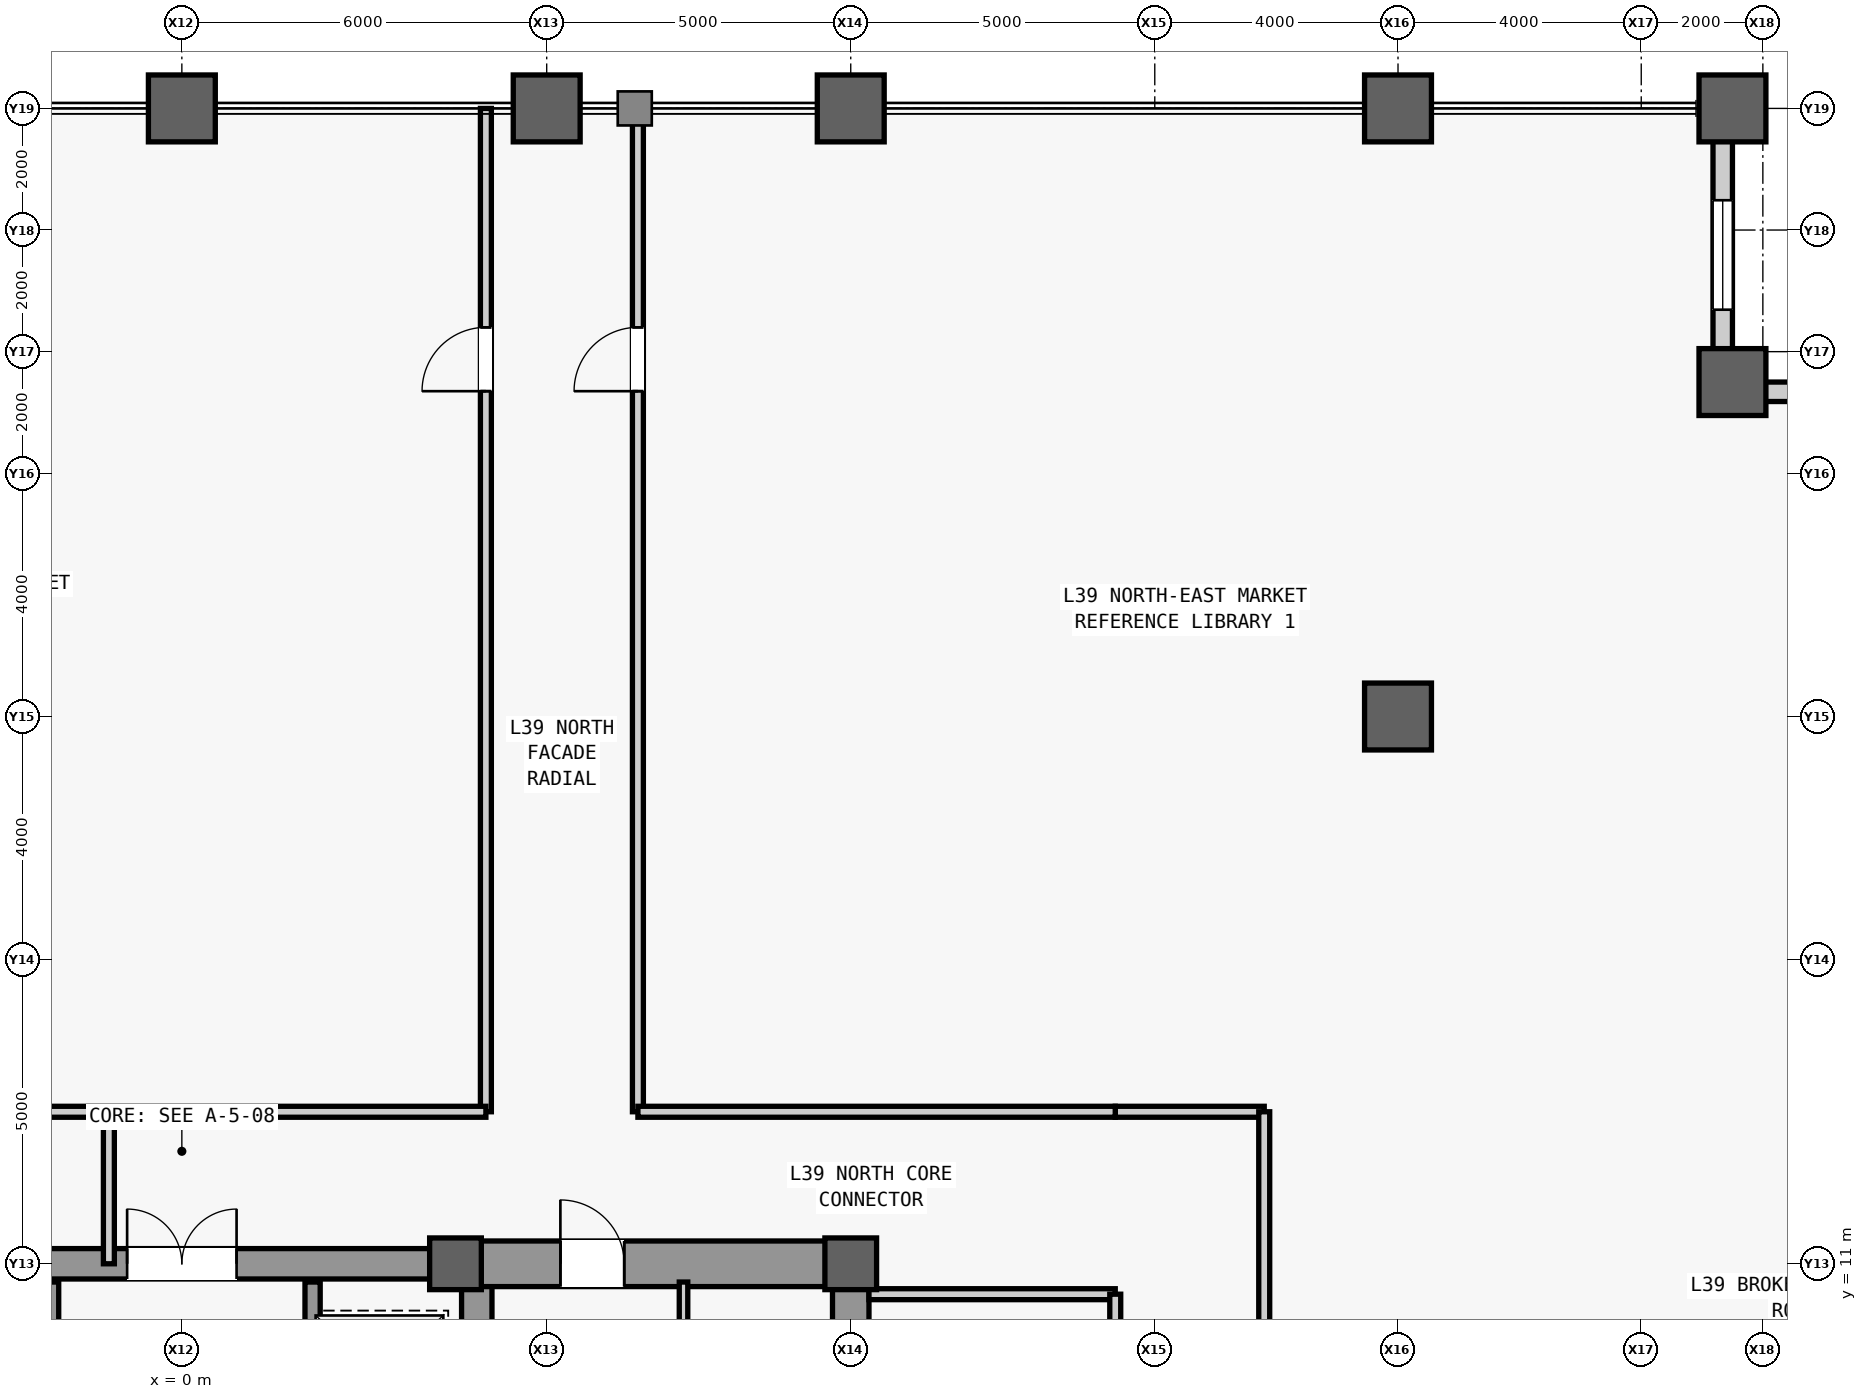
"""IFC4 building model, lengths in metres.
Left out: names, types, materials, properties, quantities, classifications, styles, units other than length and angle.
Written with IfcOpenShell. Run it as: python <this file> out.ifc"""

import sys

from ifc_helpers import new_model, si_unit, direction, frame, frame_2d, origin, origin_2d, place, context, subcontext, project, spatial, rectangle, hollow_rectangle, extrude, source, transform, mapped, element, fill, save


model = new_model("IFC4")
c1 = context("Model", 3, precision=1e-05, world=origin(), true_north=direction((0.0, 1.0)))
c2 = subcontext(c1, "Body", "Model", "MODEL_VIEW")
j1 = project(units=[si_unit("LENGTHUNIT", "METRE"), si_unit("PLANEANGLEUNIT", "RADIAN")], contexts=[c1])
p1 = place(None, origin())
s1 = spatial("IfcSite", under=j1, at=p1, CompositionType="ELEMENT")
p2 = place(p1, origin())
s2 = spatial("IfcBuilding", under=s1, at=p2, CompositionType="ELEMENT")
p3 = place(p2, frame((0.0, 0.0, 171.1)))
s3 = spatial("IfcBuildingStorey", under=s2, at=p3, CompositionType="ELEMENT", Elevation=171.1)
m1 = source(origin(), c2, "Body", "SweptSolid", [
    extrude(rectangle(XDim=22.0, YDim=0.6, at=frame_2d((11.0, 0.0))), origin(), (0.0, 0.0, 1.0), 3.78),
])
p4 = place(p3, frame((11.0, -11.0, 0.0), z_axis=(0.0, 0.0, 1.0), x_axis=(0.0, 1.0, 0.0)))
e1 = element("IfcWall", 1, at=p4, inside=s3, PredefinedType="SHEAR", context=c2, shape_type="MappedRepresentation", body=[
    mapped(m1, transform((0.0, 0.0, 0.0), scale=1.0)),
])
m2 = source(origin(), c2, "Body", "SweptSolid", [
    extrude(rectangle(XDim=1.1, YDim=2.2, at=frame_2d((0.55, 1.1))), frame((0.0, 0.31, 0.0), z_axis=(0.0, -1.0, 0.0), x_axis=(1.0, 0.0, 0.0)), (0.0, 0.0, 1.0), 0.62),
])
p5 = place(p4, frame((0.8, 0.0, 0.0)))
e2 = element("IfcOpeningElement", 2, at=p5, cuts=e1, PredefinedType="OPENING", context=c2, shape_type="MappedRepresentation", body=[
    mapped(m2, transform((0.0, 0.0, 0.0), scale=1.0)),
])
m3 = source(origin(), c2, "Body", "SweptSolid", [
    extrude(rectangle(XDim=0.9, YDim=2.15, at=frame_2d((0.45, 1.075))), frame((0.0, 0.31, 0.0), z_axis=(0.0, -1.0, 0.0), x_axis=(1.0, 0.0, 0.0)), (0.0, 0.0, 1.0), 0.62),
])
p6 = place(p4, frame((6.2, 0.0, 0.0)))
e3 = element("IfcOpeningElement", 3, at=p6, cuts=e1, PredefinedType="OPENING", context=c2, shape_type="MappedRepresentation", body=[
    mapped(m3, transform((0.0, 0.0, 0.0), scale=1.0)),
])
p7 = place(p4, frame((8.05, 0.0, 0.0)))
e4 = element("IfcOpeningElement", 4, at=p7, cuts=e1, PredefinedType="OPENING", context=c2, shape_type="MappedRepresentation", body=[
    mapped(m3, transform((0.0, 0.0, 0.0), scale=1.0)),
])
m4 = source(origin(), c2, "Body", "SweptSolid", [
    extrude(rectangle(XDim=1.3, YDim=2.3, at=frame_2d((0.65, 1.15))), frame((0.0, 0.31, 0.0), z_axis=(0.0, -1.0, 0.0), x_axis=(1.0, 0.0, 0.0)), (0.0, 0.0, 1.0), 0.62),
])
p8 = place(p4, frame((2.7, 0.0, 0.0)))
e5 = element("IfcOpeningElement", 5, at=p8, cuts=e1, PredefinedType="OPENING", context=c2, shape_type="MappedRepresentation", body=[
    mapped(m4, transform((0.0, 0.0, 0.0), scale=1.0)),
])
p9 = place(p4, frame((13.35, 0.0, 0.0)))
e6 = element("IfcOpeningElement", 6, at=p9, cuts=e1, PredefinedType="OPENING", context=c2, shape_type="MappedRepresentation", body=[
    mapped(m4, transform((0.0, 0.0, 0.0), scale=1.0)),
])
m5 = source(origin(), c2, "Body", "SweptSolid", [
    extrude(rectangle(XDim=21.4, YDim=0.5, at=frame_2d((10.7, 0.0))), origin(), (0.0, 0.0, 1.0), 3.78),
])
p10 = place(p3, frame((4.85, -10.7, 0.0), z_axis=(0.0, 0.0, 1.0), x_axis=(0.0, 1.0, 0.0)))
e7 = element("IfcWall", 7, at=p10, inside=s3, PredefinedType="SHEAR", context=c2, shape_type="MappedRepresentation", body=[
    mapped(m5, transform((0.0, 0.0, 0.0), scale=1.0)),
])
m6 = source(origin(), c2, "Body", "SweptSolid", [
    extrude(rectangle(XDim=5.85, YDim=0.75, at=frame_2d((2.925, 0.0))), origin(), (0.0, 0.0, 1.0), 3.78),
])
p11 = place(p3, frame((4.85, 11.0, 0.0), z_axis=(0.0, 0.0, 1.0), x_axis=(1.0, 0.0, 0.0)))
e8 = element("IfcWall", 8, at=p11, inside=s3, PredefinedType="SHEAR", context=c2, shape_type="MappedRepresentation", body=[
    mapped(m6, transform((0.0, 0.0, 0.0), scale=1.0)),
])
m7 = source(origin(), c2, "Body", "SweptSolid", [
    extrude(rectangle(XDim=1.05, YDim=2.2, at=frame_2d((0.525, 1.1))), frame((0.0, 0.385, 0.0), z_axis=(0.0, -1.0, 0.0), x_axis=(1.0, 0.0, 0.0)), (0.0, 0.0, 1.0), 0.77),
])
p12 = place(p11, frame((1.375, 0.0, 0.0)))
e9 = element("IfcOpeningElement", 9, at=p12, cuts=e8, PredefinedType="OPENING", context=c2, shape_type="MappedRepresentation", body=[
    mapped(m7, transform((0.0, 0.0, 0.0), scale=1.0)),
])
m8 = source(origin(), c2, "Body", "SweptSolid", [
    extrude(rectangle(XDim=9.2, YDim=0.5, at=frame_2d((4.6, 0.0))), origin(), (0.0, 0.0, 1.0), 3.78),
])
p13 = place(p3, frame((-4.6, 11.0, 0.0), z_axis=(0.0, 0.0, 1.0), x_axis=(1.0, 0.0, 0.0)))
e10 = element("IfcWall", 10, at=p13, inside=s3, PredefinedType="SHEAR", context=c2, shape_type="MappedRepresentation", body=[
    mapped(m8, transform((0.0, 0.0, 0.0), scale=1.0)),
])
m9 = source(origin(), c2, "Body", "SweptSolid", [
    extrude(rectangle(XDim=1.8, YDim=2.25, at=frame_2d((0.9, 1.125))), frame((0.0, 0.26, 0.0), z_axis=(0.0, -1.0, 0.0), x_axis=(1.0, 0.0, 0.0)), (0.0, 0.0, 1.0), 0.52),
])
p14 = place(p13, frame((3.7, 0.0, 0.0)))
e11 = element("IfcOpeningElement", 11, at=p14, cuts=e10, PredefinedType="OPENING", context=c2, shape_type="MappedRepresentation", body=[
    mapped(m9, transform((0.0, 0.0, 0.0), scale=1.0)),
])
m10 = source(origin(), c2, "Body", "SweptSolid", [
    extrude(hollow_rectangle(XDim=1.1, YDim=1.1, WallThickness=0.06, at=origin_2d()), origin(), (0.0, 0.0, 1.0), 4.0),
])
p15 = place(p3, frame((0.0, 30.0, 0.0), z_axis=(0.0, 0.0, 1.0), x_axis=(1.0, 0.0, 0.0)))
e12 = element("IfcColumn", 12, at=p15, inside=s3, PredefinedType="COLUMN", context=c2, shape_type="MappedRepresentation", body=[
    mapped(m10, transform((0.0, 0.0, 0.0), scale=1.0)),
])
m11 = source(origin(), c2, "Body", "SweptSolid", [
    extrude(rectangle(XDim=0.85, YDim=0.85, at=origin_2d()), origin(), (0.0, 0.0, 1.0), 4.0),
])
p16 = place(p3, frame((4.5, 11.0, 0.0), z_axis=(0.0, 0.0, 1.0), x_axis=(1.0, 0.0, 0.0)))
e13 = element("IfcColumn", 13, at=p16, inside=s3, PredefinedType="COLUMN", context=c2, shape_type="MappedRepresentation", body=[
    mapped(m11, transform((0.0, 0.0, 0.0), scale=1.0)),
])
p17 = place(p3, frame((6.0, 30.0, 0.0), z_axis=(0.0, 0.0, 1.0), x_axis=(1.0, 0.0, 0.0)))
e14 = element("IfcColumn", 14, at=p17, inside=s3, PredefinedType="COLUMN", context=c2, shape_type="MappedRepresentation", body=[
    mapped(m10, transform((0.0, 0.0, 0.0), scale=1.0)),
])
p18 = place(p3, frame((11.0, 11.0, 0.0), z_axis=(0.0, 0.0, 1.0), x_axis=(1.0, 0.0, 0.0)))
e15 = element("IfcColumn", 15, at=p18, inside=s3, PredefinedType="COLUMN", context=c2, shape_type="MappedRepresentation", body=[
    mapped(m11, transform((0.0, 0.0, 0.0), scale=1.0)),
])
for number, where, z_axis, x_axis in (
    (16, (11.0, 30.0, 0.0), (0.0, 0.0, 1.0), (1.0, 0.0, 0.0)),
    (17, (20.0, 20.0, 0.0), (0.0, 0.0, 1.0), (1.0, 0.0, 0.0)),
    (18, (20.0, 30.0, 0.0), (0.0, 0.0, 1.0), (1.0, 0.0, 0.0)),
    (19, (25.5, 25.5, 0.0), (0.0, 0.0, 1.0), (1.0, 0.0, 0.0)),
    (20, (25.5, 30.0, 0.0), (0.0, 0.0, 1.0), (1.0, 0.0, 0.0)),
):
    element("IfcColumn", number, at=place(p3, frame(where, z_axis=z_axis, x_axis=x_axis)), inside=s3, PredefinedType="COLUMN", context=c2, shape_type="MappedRepresentation", body=[
        mapped(m10, transform((0.0, 0.0, 0.0), scale=1.0)),
    ])
m12 = source(origin(), c2, "Body", "SweptSolid", [
    extrude(rectangle(XDim=4.18, YDim=0.32, at=frame_2d((2.09, 0.0))), origin(), (0.0, 0.0, 1.0), 3.164),
])
p19 = place(p3, frame((25.5, 25.34, 0.0), z_axis=(0.0, 0.0, 1.0), x_axis=(1.0, 0.0, 0.0)))
e21 = element("IfcWall", 21, at=p19, inside=s3, PredefinedType="STANDARD", context=c2, shape_type="MappedRepresentation", body=[
    mapped(m12, transform((0.0, 0.0, 0.0), scale=1.0)),
])
m13 = source(origin(), c2, "Body", "SweptSolid", [
    extrude(rectangle(XDim=1.8, YDim=2.4, at=frame_2d((0.9, 1.2))), frame((0.0, 0.17, 0.0), z_axis=(0.0, -1.0, 0.0), x_axis=(1.0, 0.0, 0.0)), (0.0, 0.0, 1.0), 0.34),
])
p20 = place(p19, frame((1.19, 0.0, 0.5)))
e22 = element("IfcOpeningElement", 22, at=p20, cuts=e21, PredefinedType="OPENING", context=c2, shape_type="MappedRepresentation", body=[
    mapped(m13, transform((0.0, 0.0, 0.0), scale=1.0)),
])
p21 = place(p3, frame((25.34, 25.5, 0.0), z_axis=(0.0, 0.0, 1.0), x_axis=(0.0, 1.0, 0.0)))
e23 = element("IfcWall", 23, at=p21, inside=s3, PredefinedType="STANDARD", context=c2, shape_type="MappedRepresentation", body=[
    mapped(m12, transform((0.0, 0.0, 0.0), scale=1.0)),
])
p22 = place(p21, frame((1.19, 0.0, 0.5)))
e24 = element("IfcOpeningElement", 24, at=p22, cuts=e23, PredefinedType="OPENING", context=c2, shape_type="MappedRepresentation", body=[
    mapped(m13, transform((0.0, 0.0, 0.0), scale=1.0)),
])
m14 = source(origin(), c2, "Body", "SweptSolid", [
    extrude(rectangle(XDim=9.4, YDim=0.14, at=frame_2d((4.7, 0.0))), origin(), (0.0, 0.0, 1.0), 3.78),
])
p23 = place(p3, frame((8.25, 1.3, 0.0), z_axis=(0.0, 0.0, 1.0), x_axis=(0.0, 1.0, 0.0)))
e25 = element("IfcWall", 25, at=p23, inside=s3, PredefinedType="PARTITIONING", context=c2, shape_type="MappedRepresentation", body=[
    mapped(m14, transform((0.0, 0.0, 0.0), scale=1.0)),
])
m15 = source(origin(), c2, "Body", "SweptSolid", [
    extrude(rectangle(XDim=4.05, YDim=0.18, at=frame_2d((2.025, 0.0))), origin(), (0.0, 0.0, 1.0), 3.78),
])
p24 = place(p3, frame((11.3, 10.5, 0.0), z_axis=(0.0, 0.0, 1.0), x_axis=(1.0, 0.0, 0.0)))
e26 = element("IfcWall", 26, at=p24, inside=s3, PredefinedType="PARTITIONING", context=c2, shape_type="MappedRepresentation", body=[
    mapped(m15, transform((0.0, 0.0, 0.0), scale=1.0)),
])
m16 = source(origin(), c2, "Body", "SweptSolid", [
    extrude(rectangle(XDim=16.6, YDim=0.18, at=frame_2d((8.3, 0.0))), origin(), (0.0, 0.0, 1.0), 3.78),
])
p25 = place(p3, frame((15.35, -6.1, 0.0), z_axis=(0.0, 0.0, 1.0), x_axis=(0.0, 1.0, 0.0)))
e27 = element("IfcWall", 27, at=p25, inside=s3, PredefinedType="PARTITIONING", context=c2, shape_type="MappedRepresentation", body=[
    mapped(m16, transform((0.0, 0.0, 0.0), scale=1.0)),
])
m17 = source(origin(), c2, "Body", "SweptSolid", [
    extrude(rectangle(XDim=1.8, YDim=2.25, at=frame_2d((0.9, 1.125))), frame((0.0, 0.1, 0.0), z_axis=(0.0, -1.0, 0.0), x_axis=(1.0, 0.0, 0.0)), (0.0, 0.0, 1.0), 0.2),
])
p26 = place(p25, frame((2.7, 0.0, 0.0)))
e28 = element("IfcOpeningElement", 28, at=p26, cuts=e27, PredefinedType="OPENING", context=c2, shape_type="MappedRepresentation", body=[
    mapped(m17, transform((0.0, 0.0, 0.0), scale=1.0)),
])
p27 = place(p25, frame((13.0, 0.0, 0.0)))
e29 = element("IfcOpeningElement", 29, at=p27, cuts=e27, PredefinedType="OPENING", context=c2, shape_type="MappedRepresentation", body=[
    mapped(m17, transform((0.0, 0.0, 0.0), scale=1.0)),
])
m18 = source(origin(), c2, "Body", "SweptSolid", [
    extrude(rectangle(XDim=5.4, YDim=0.25, at=frame_2d((2.7, 0.0))), origin(), (0.0, 0.0, 1.0), 3.78),
])
p28 = place(p3, frame((-2.15, 5.3, 0.0), z_axis=(0.0, 0.0, 1.0), x_axis=(0.0, 1.0, 0.0)))
e30 = element("IfcWall", 30, at=p28, inside=s3, PredefinedType="SHEAR", context=c2, shape_type="MappedRepresentation", body=[
    mapped(m18, transform((0.0, 0.0, 0.0), scale=1.0)),
])
m19 = source(origin(), c2, "Body", "SweptSolid", [
    extrude(rectangle(XDim=1.2, YDim=2.3, at=frame_2d((0.6, 1.15))), frame((0.0, 0.135, 0.0), z_axis=(0.0, -1.0, 0.0), x_axis=(1.0, 0.0, 0.0)), (0.0, 0.0, 1.0), 0.27),
])
p29 = place(p28, frame((3.3, 0.0, 0.0)))
e31 = element("IfcOpeningElement", 31, at=p29, cuts=e30, PredefinedType="OPENING", context=c2, shape_type="MappedRepresentation", body=[
    mapped(m19, transform((0.0, 0.0, 0.0), scale=1.0)),
])
p30 = place(p28, frame((0.9, 0.0, 0.0)))
e32 = element("IfcOpeningElement", 32, at=p30, cuts=e30, PredefinedType="OPENING", context=c2, shape_type="MappedRepresentation", body=[
    mapped(m19, transform((0.0, 0.0, 0.0), scale=1.0)),
])
p31 = place(p3, frame((2.15, 5.3, 0.0), z_axis=(0.0, 0.0, 1.0), x_axis=(0.0, 1.0, 0.0)))
e33 = element("IfcWall", 33, at=p31, inside=s3, PredefinedType="SHEAR", context=c2, shape_type="MappedRepresentation", body=[
    mapped(m18, transform((0.0, 0.0, 0.0), scale=1.0)),
])
p32 = place(p31, frame((3.3, 0.0, 0.0)))
e34 = element("IfcOpeningElement", 34, at=p32, cuts=e33, PredefinedType="OPENING", context=c2, shape_type="MappedRepresentation", body=[
    mapped(m19, transform((0.0, 0.0, 0.0), scale=1.0)),
])
p33 = place(p31, frame((0.9, 0.0, 0.0)))
e35 = element("IfcOpeningElement", 35, at=p33, cuts=e33, PredefinedType="OPENING", context=c2, shape_type="MappedRepresentation", body=[
    mapped(m19, transform((0.0, 0.0, 0.0), scale=1.0)),
])
m20 = source(origin(), c2, "Body", "SweptSolid", [
    extrude(rectangle(XDim=2.45, YDim=0.18, at=frame_2d((1.225, 0.0))), origin(), (0.0, 0.0, 1.0), 3.78),
])
p34 = place(p3, frame((15.35, 13.5, 0.0), z_axis=(0.0, 0.0, 1.0), x_axis=(1.0, 0.0, 0.0)))
e36 = element("IfcWall", 36, at=p34, inside=s3, PredefinedType="PARTITIONING", context=c2, shape_type="MappedRepresentation", body=[
    mapped(m20, transform((0.0, 0.0, 0.0), scale=1.0)),
])
m21 = source(origin(), c2, "Body", "SweptSolid", [
    extrude(rectangle(XDim=2.5, YDim=0.18, at=frame_2d((1.25, 0.0))), origin(), (0.0, 0.0, 1.0), 3.78),
])
p35 = place(p3, frame((-1.2, 11.0, 0.0), z_axis=(0.0, 0.0, 1.0), x_axis=(0.0, 1.0, 0.0)))
e37 = element("IfcWall", 37, at=p35, inside=s3, PredefinedType="PARTITIONING", context=c2, shape_type="MappedRepresentation", body=[
    mapped(m21, transform((0.0, 0.0, 0.0), scale=1.0)),
])
m22 = source(origin(), c2, "Body", "SweptSolid", [
    extrude(rectangle(XDim=16.5, YDim=0.18, at=frame_2d((8.25, 0.0))), origin(), (0.0, 0.0, 1.0), 3.78),
])
p36 = place(p3, frame((5.0, 13.5, 0.0), z_axis=(0.0, 0.0, 1.0), x_axis=(0.0, 1.0, 0.0)))
e38 = element("IfcWall", 38, at=p36, inside=s3, PredefinedType="PARTITIONING", context=c2, shape_type="MappedRepresentation", body=[
    mapped(m22, transform((0.0, 0.0, 0.0), scale=1.0)),
])
m23 = source(origin(), c2, "Body", "SweptSolid", [
    extrude(rectangle(XDim=1.05, YDim=2.2, at=frame_2d((0.525, 1.1))), frame((0.0, 0.1, 0.0), z_axis=(0.0, -1.0, 0.0), x_axis=(1.0, 0.0, 0.0)), (0.0, 0.0, 1.0), 0.2),
])
p37 = place(p36, frame((11.85, 0.0, 0.0)))
e39 = element("IfcOpeningElement", 39, at=p37, cuts=e38, PredefinedType="OPENING", context=c2, shape_type="MappedRepresentation", body=[
    mapped(m23, transform((0.0, 0.0, 0.0), scale=1.0)),
])
m24 = source(origin(), c2, "Body", "SweptSolid", [
    extrude(rectangle(XDim=20.35, YDim=0.18, at=frame_2d((10.175, 0.0))), origin(), (0.0, 0.0, 1.0), 3.78),
])
p38 = place(p3, frame((-15.35, 13.5, 0.0), z_axis=(0.0, 0.0, 1.0), x_axis=(1.0, 0.0, 0.0)))
e40 = element("IfcWall", 40, at=p38, inside=s3, PredefinedType="PARTITIONING", context=c2, shape_type="MappedRepresentation", body=[
    mapped(m24, transform((0.0, 0.0, 0.0), scale=1.0)),
])
p39 = place(p3, frame((7.5, 13.5, 0.0), z_axis=(0.0, 0.0, 1.0), x_axis=(0.0, 1.0, 0.0)))
e41 = element("IfcWall", 41, at=p39, inside=s3, PredefinedType="PARTITIONING", context=c2, shape_type="MappedRepresentation", body=[
    mapped(m22, transform((0.0, 0.0, 0.0), scale=1.0)),
])
p40 = place(p39, frame((11.85, 0.0, 0.0)))
e42 = element("IfcOpeningElement", 42, at=p40, cuts=e41, PredefinedType="OPENING", context=c2, shape_type="MappedRepresentation", body=[
    mapped(m23, transform((0.0, 0.0, 0.0), scale=1.0)),
])
m25 = source(origin(), c2, "Body", "SweptSolid", [
    extrude(rectangle(XDim=7.85, YDim=0.18, at=frame_2d((3.925, 0.0))), origin(), (0.0, 0.0, 1.0), 3.78),
])
p41 = place(p3, frame((7.5, 13.5, 0.0), z_axis=(0.0, 0.0, 1.0), x_axis=(1.0, 0.0, 0.0)))
e43 = element("IfcWall", 43, at=p41, inside=s3, PredefinedType="PARTITIONING", context=c2, shape_type="MappedRepresentation", body=[
    mapped(m25, transform((0.0, 0.0, 0.0), scale=1.0)),
])
m26 = source(origin(), c2, "Body", "SweptSolid", [
    extrude(rectangle(XDim=6.25, YDim=0.18, at=frame_2d((3.125, 0.0))), origin(), (0.0, 0.0, 1.0), 3.78),
])
p42 = place(p3, frame((17.8, 7.25, 0.0), z_axis=(0.0, 0.0, 1.0), x_axis=(0.0, 1.0, 0.0)))
e44 = element("IfcWall", 44, at=p42, inside=s3, PredefinedType="PARTITIONING", context=c2, shape_type="MappedRepresentation", body=[
    mapped(m26, transform((0.0, 0.0, 0.0), scale=1.0)),
])
m27 = source(origin(), c2, "Body", "SweptSolid", [
    extrude(rectangle(XDim=1.8, YDim=2.4, at=frame_2d((0.9, 1.2))), frame((0.0, 0.03, 0.0), z_axis=(0.0, -1.0, 0.0), x_axis=(1.0, 0.0, 0.0)), (0.0, 0.0, 1.0), 0.06),
])
p43 = place(p22, origin())
e45 = element("IfcWindow", 45, at=p43, inside=s3, PartitioningType="SINGLE_PANEL", PredefinedType="WINDOW", context=c2, shape_type="MappedRepresentation", body=[
    mapped(m27, transform((0.0, 0.0, 0.0), scale=1.0)),
])
fill(e24, e45)
m28 = source(origin(), c2, "Body", "SweptSolid", [
    extrude(rectangle(XDim=1.05, YDim=2.2, at=frame_2d((0.525, 1.1))), frame((0.0, 0.025, 0.0), z_axis=(0.0, -1.0, 0.0), x_axis=(1.0, 0.0, 0.0)), (0.0, 0.0, 1.0), 0.05),
])
p44 = place(p12, origin())
e46 = element("IfcDoor", 46, at=p44, inside=s3, OperationType="SINGLE_SWING_LEFT", PredefinedType="DOOR", context=c2, shape_type="MappedRepresentation", body=[
    mapped(m28, transform((0.0, 0.0, 0.0), scale=1.0)),
])
fill(e9, e46)
m29 = source(origin(), c2, "Body", "SweptSolid", [
    extrude(rectangle(XDim=1.8, YDim=2.25, at=frame_2d((0.9, 1.125))), frame((0.0, 0.025, 0.0), z_axis=(0.0, -1.0, 0.0), x_axis=(1.0, 0.0, 0.0)), (0.0, 0.0, 1.0), 0.05),
])
p45 = place(p14, origin())
e47 = element("IfcDoor", 47, at=p45, inside=s3, OperationType="SINGLE_SWING_RIGHT", PredefinedType="DOOR", context=c2, shape_type="MappedRepresentation", body=[
    mapped(m29, transform((0.0, 0.0, 0.0), scale=1.0)),
])
fill(e11, e47)
p46 = place(p37, origin())
e48 = element("IfcDoor", 48, at=p46, inside=s3, OperationType="SINGLE_SWING_LEFT", PredefinedType="DOOR", context=c2, shape_type="MappedRepresentation", body=[
    mapped(m28, transform((0.0, 0.0, 0.0), scale=1.0)),
])
fill(e39, e48)
p47 = place(p40, origin())
e49 = element("IfcDoor", 49, at=p47, inside=s3, OperationType="SINGLE_SWING_LEFT", PredefinedType="DOOR", context=c2, shape_type="MappedRepresentation", body=[
    mapped(m28, transform((0.0, 0.0, 0.0), scale=1.0)),
])
fill(e42, e49)
save(model, sys.argv[1])
